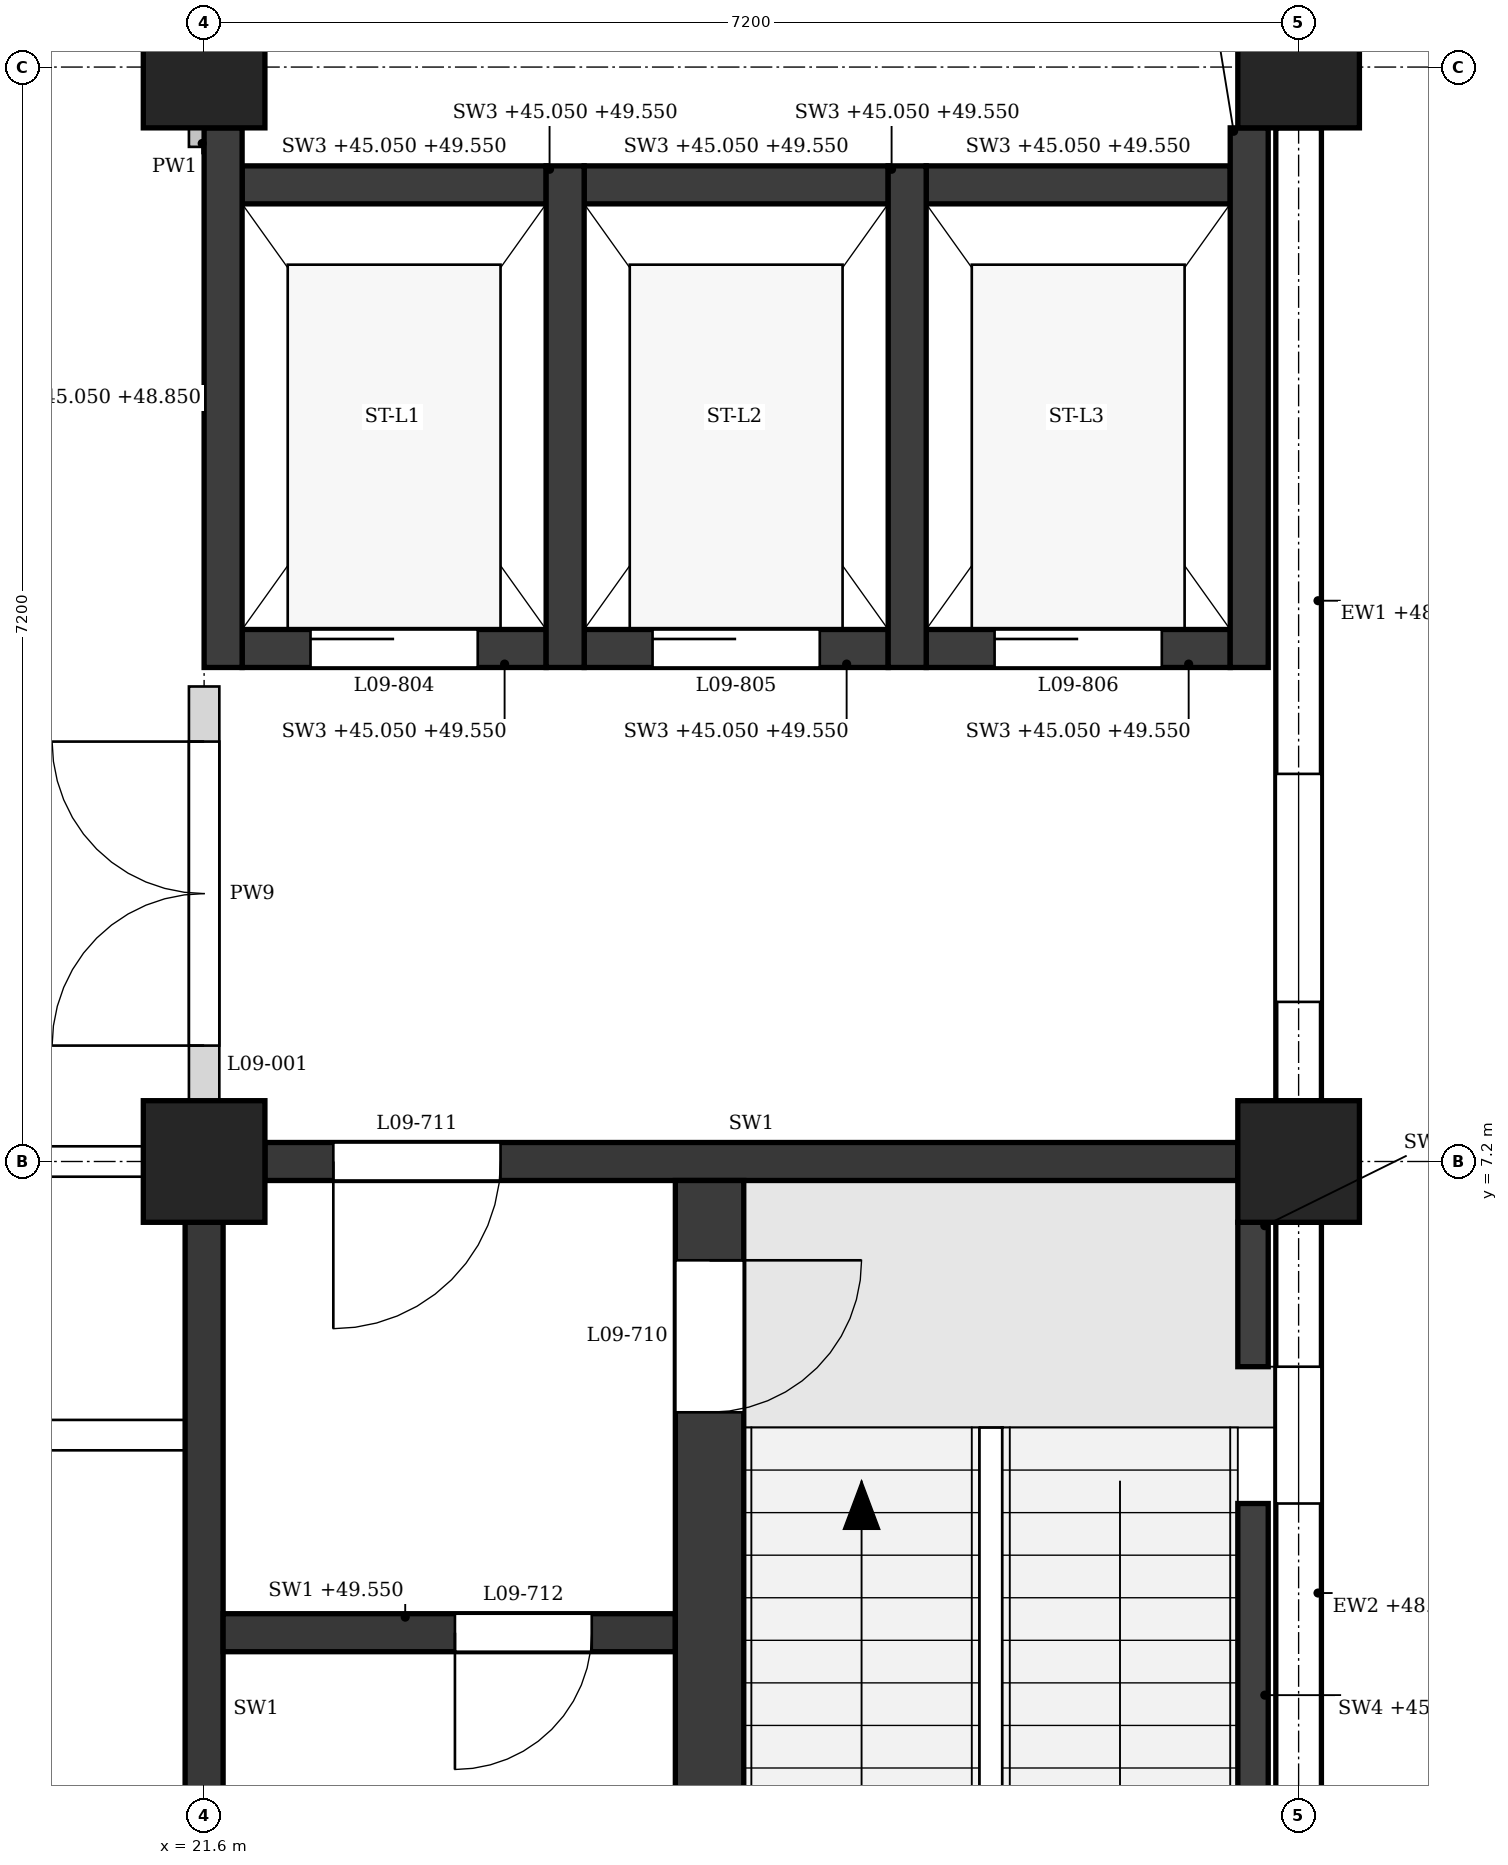
"""IFC4 building model, lengths in metres.
Left out: names, types, materials, properties, quantities, classifications, styles, units other than length and angle.
Written with IfcOpenShell. Run it as: python <this file> out.ifc"""

import sys

from ifc_helpers import new_model, si_unit, direction, frame, frame_2d, origin, origin_2d, place, context, subcontext, project, spatial, polyline, rectangle, outline, extrude, element, fill, save


model = new_model("IFC4")
c1 = context("Model", 3, precision=1e-05, world=origin(), true_north=direction((0.0, 1.0)))
c2 = subcontext(c1, "Body", "Model", "MODEL_VIEW")
j1 = project(units=[si_unit("LENGTHUNIT", "METRE"), si_unit("PLANEANGLEUNIT", "RADIAN")], contexts=[c1])
p1 = place(None, origin())
s1 = spatial("IfcSite", under=j1, at=p1, CompositionType="ELEMENT")
p2 = place(p1, origin())
s2 = spatial("IfcBuilding", under=s1, at=p2, CompositionType="ELEMENT")
p3 = place(p2, frame((0.0, 0.0, 45.3)))
s3 = spatial("IfcBuildingStorey", under=s2, at=p3, CompositionType="ELEMENT", Elevation=45.3)
for number, where, z_axis, x_axis in (
    (1, (21.6, 7.2, 0.0), (0.0, 0.0, 1.0), (1.0, 0.0, 0.0)),
    (2, (21.6, 14.4, 0.0), (0.0, 0.0, 1.0), (1.0, 0.0, 0.0)),
    (3, (28.8, 7.2, 0.0), (0.0, 0.0, 1.0), (1.0, 0.0, 0.0)),
    (4, (28.8, 14.4, 0.0), (0.0, 0.0, 1.0), (1.0, 0.0, 0.0)),
):
    element("IfcColumn", number, at=place(p3, frame(where, z_axis=z_axis, x_axis=x_axis)), inside=s3, PredefinedType="COLUMN", context=c2, shape_type="SweptSolid", body=[
        extrude(rectangle(XDim=0.8, YDim=0.8, at=origin_2d()), origin(), (0.0, 0.0, 1.0), 4.5),
    ])
p4 = place(p3, frame((28.8, 0.4, 0.0), z_axis=(0.0, 0.0, 1.0), x_axis=(0.0, 1.0, 0.0)))
e5 = element("IfcWall", 5, at=p4, inside=s3, PredefinedType="STANDARD", context=c2, shape_type="SweptSolid", body=[
    extrude(rectangle(XDim=6.4, YDim=0.3, at=frame_2d((3.2, 0.0))), origin(), (0.0, 0.0, 1.0), 3.65),
])
p5 = place(p4, frame((0.95, 0.0, 0.9)))
e6 = element("IfcOpeningElement", 6, at=p5, cuts=e5, PredefinedType="OPENING", context=c2, shape_type="SweptSolid", body=[
    extrude(outline(polyline([(0.0, 0.0), (0.9, 0.0), (0.9, 2.25), (0.45, 2.7), (0.0, 2.25), (0.0, 0.0)])), frame((0.0, 0.16, 0.0), z_axis=(0.0, -1.0, 0.0), x_axis=(1.0, 0.0, 0.0)), (0.0, 0.0, 1.0), 0.32),
])
p6 = place(p4, frame((4.55, 0.0, 0.9)))
e7 = element("IfcOpeningElement", 7, at=p6, cuts=e5, PredefinedType="OPENING", context=c2, shape_type="SweptSolid", body=[
    extrude(outline(polyline([(0.0, 0.0), (0.9, 0.0), (0.9, 2.25), (0.45, 2.7), (0.0, 2.25), (0.0, 0.0)])), frame((0.0, 0.16, 0.0), z_axis=(0.0, -1.0, 0.0), x_axis=(1.0, 0.0, 0.0)), (0.0, 0.0, 1.0), 0.32),
])
p7 = place(p3, frame((28.8, 7.6, 0.0), z_axis=(0.0, 0.0, 1.0), x_axis=(0.0, 1.0, 0.0)))
e8 = element("IfcWall", 8, at=p7, inside=s3, PredefinedType="STANDARD", context=c2, shape_type="SweptSolid", body=[
    extrude(rectangle(XDim=6.4, YDim=0.3, at=frame_2d((3.2, 0.0))), origin(), (0.0, 0.0, 1.0), 3.65),
])
p8 = place(p7, frame((0.65, 0.0, 0.9)))
e9 = element("IfcOpeningElement", 9, at=p8, cuts=e8, PredefinedType="OPENING", context=c2, shape_type="SweptSolid", body=[
    extrude(outline(polyline([(0.0, 0.0), (1.5, 0.0), (1.5, 1.95), (0.75, 2.7), (0.0, 1.95), (0.0, 0.0)])), frame((0.0, 0.16, 0.0), z_axis=(0.0, -1.0, 0.0), x_axis=(1.0, 0.0, 0.0)), (0.0, 0.0, 1.0), 0.32),
])
p9 = place(p3, frame((22.0, 7.2, 0.0), z_axis=(0.0, 0.0, 1.0), x_axis=(1.0, 0.0, 0.0)))
e10 = element("IfcWall", 10, at=p9, inside=s3, PredefinedType="SHEAR", context=c2, shape_type="SweptSolid", body=[
    extrude(rectangle(XDim=6.4, YDim=0.25, at=frame_2d((3.2, 0.0))), origin(), (0.0, 0.0, 1.0), 3.55),
])
p10 = place(p9, frame((0.45, 0.0, 0.0)))
e11 = element("IfcOpeningElement", 11, at=p10, cuts=e10, PredefinedType="OPENING", context=c2, shape_type="SweptSolid", body=[
    extrude(rectangle(XDim=1.1, YDim=2.1, at=frame_2d((0.55, 1.05))), frame((0.0, 0.135, 0.0), z_axis=(0.0, -1.0, 0.0), x_axis=(1.0, 0.0, 0.0)), (0.0, 0.0, 1.0), 0.27),
])
p11 = place(p3, frame((21.6, 0.4, 0.0), z_axis=(0.0, 0.0, 1.0), x_axis=(0.0, 1.0, 0.0)))
e12 = element("IfcWall", 12, at=p11, inside=s3, PredefinedType="SHEAR", context=c2, shape_type="SweptSolid", body=[
    extrude(rectangle(XDim=6.4, YDim=0.25, at=frame_2d((3.2, 0.0))), origin(), (0.0, 0.0, 1.0), 3.55),
])
p12 = place(p3, frame((28.5, 2.25, -0.25), z_axis=(0.0, 0.0, 1.0), x_axis=(0.0, 1.0, 0.0)))
e13 = element("IfcWall", 13, at=p12, inside=s3, PredefinedType="SHEAR", context=c2, shape_type="SweptSolid", body=[
    extrude(rectangle(XDim=2.7, YDim=0.2, at=frame_2d((1.35, 0.0))), origin(), (0.0, 0.0, 1.0), 4.5),
])
p13 = place(p3, frame((28.5, 5.85, -0.25), z_axis=(0.0, 0.0, 1.0), x_axis=(0.0, 1.0, 0.0)))
e14 = element("IfcWall", 14, at=p13, inside=s3, PredefinedType="SHEAR", context=c2, shape_type="SweptSolid", body=[
    extrude(rectangle(XDim=0.95, YDim=0.2, at=frame_2d((0.475, 0.0))), origin(), (0.0, 0.0, 1.0), 4.5),
])
p14 = place(p3, frame((24.925, 0.15, 0.0), z_axis=(0.0, 0.0, 1.0), x_axis=(0.0, 1.0, 0.0)))
e15 = element("IfcWall", 15, at=p14, inside=s3, PredefinedType="SHEAR", context=c2, shape_type="SweptSolid", body=[
    extrude(rectangle(XDim=6.925, YDim=0.45, at=frame_2d((3.462, 0.0))), origin(), (0.0, 0.0, 1.0), 4.25),
])
p15 = place(p14, frame((5.4, 0.0, 0.0)))
e16 = element("IfcOpeningElement", 16, at=p15, cuts=e15, PredefinedType="OPENING", context=c2, shape_type="SweptSolid", body=[
    extrude(rectangle(XDim=1.0, YDim=2.1, at=frame_2d((0.5, 1.05))), frame((0.0, 0.235, 0.0), z_axis=(0.0, -1.0, 0.0), x_axis=(1.0, 0.0, 0.0)), (0.0, 0.0, 1.0), 0.47),
])
p16 = place(p3, frame((21.725, 4.1, 0.0), z_axis=(0.0, 0.0, 1.0), x_axis=(1.0, 0.0, 0.0)))
e17 = element("IfcWall", 17, at=p16, inside=s3, PredefinedType="SHEAR", context=c2, shape_type="SweptSolid", body=[
    extrude(rectangle(XDim=2.975, YDim=0.25, at=frame_2d((1.487, 0.0))), origin(), (0.0, 0.0, 1.0), 4.25),
])
p17 = place(p16, frame((1.525, 0.0, 0.0)))
e18 = element("IfcOpeningElement", 18, at=p17, cuts=e17, PredefinedType="OPENING", context=c2, shape_type="SweptSolid", body=[
    extrude(rectangle(XDim=0.9, YDim=2.1, at=frame_2d((0.45, 1.05))), frame((0.0, 0.135, 0.0), z_axis=(0.0, -1.0, 0.0), x_axis=(1.0, 0.0, 0.0)), (0.0, 0.0, 1.0), 0.27),
])
p18 = place(p3, frame((21.725, 10.45, -0.25), z_axis=(0.0, 0.0, 1.0), x_axis=(0.0, 1.0, 0.0)))
e19 = element("IfcWall", 19, at=p18, inside=s3, PredefinedType="SHEAR", context=c2, shape_type="SweptSolid", body=[
    extrude(rectangle(XDim=3.55, YDim=0.25, at=frame_2d((1.775, 0.0))), origin(), (0.0, 0.0, 1.0), 3.8),
])
for number, where, z_axis, x_axis in (
    (20, (23.975, 10.45, -0.25), (0.0, 0.0, 1.0), (0.0, 1.0, 0.0)),
    (21, (26.225, 10.45, -0.25), (0.0, 0.0, 1.0), (0.0, 1.0, 0.0)),
):
    element("IfcWall", number, at=place(p3, frame(where, z_axis=z_axis, x_axis=x_axis)), inside=s3, PredefinedType="SHEAR", context=c2, shape_type="SweptSolid", body=[
        extrude(rectangle(XDim=3.3, YDim=0.25, at=frame_2d((1.65, 0.0))), origin(), (0.0, 0.0, 1.0), 4.5),
    ])
p19 = place(p3, frame((28.475, 10.45, -0.25), z_axis=(0.0, 0.0, 1.0), x_axis=(0.0, 1.0, 0.0)))
e22 = element("IfcWall", 22, at=p19, inside=s3, PredefinedType="SHEAR", context=c2, shape_type="SweptSolid", body=[
    extrude(rectangle(XDim=3.55, YDim=0.25, at=frame_2d((1.775, 0.0))), origin(), (0.0, 0.0, 1.0), 4.5),
])
p20 = place(p3, frame((21.85, 10.575, -0.25), z_axis=(0.0, 0.0, 1.0), x_axis=(1.0, 0.0, 0.0)))
e23 = element("IfcWall", 23, at=p20, inside=s3, PredefinedType="SHEAR", context=c2, shape_type="SweptSolid", body=[
    extrude(rectangle(XDim=2.0, YDim=0.25, at=frame_2d((1.0, 0.0))), origin(), (0.0, 0.0, 1.0), 4.5),
])
p21 = place(p20, frame((0.45, 0.0, 0.25)))
e24 = element("IfcOpeningElement", 24, at=p21, cuts=e23, PredefinedType="OPENING", context=c2, shape_type="SweptSolid", body=[
    extrude(rectangle(XDim=1.1, YDim=2.1, at=frame_2d((0.55, 1.05))), frame((0.0, 0.135, 0.0), z_axis=(0.0, -1.0, 0.0), x_axis=(1.0, 0.0, 0.0)), (0.0, 0.0, 1.0), 0.27),
])
p22 = place(p3, frame((21.85, 13.625, -0.25), z_axis=(0.0, 0.0, 1.0), x_axis=(1.0, 0.0, 0.0)))
e25 = element("IfcWall", 25, at=p22, inside=s3, PredefinedType="SHEAR", context=c2, shape_type="SweptSolid", body=[
    extrude(rectangle(XDim=2.0, YDim=0.25, at=frame_2d((1.0, 0.0))), origin(), (0.0, 0.0, 1.0), 4.5),
])
p23 = place(p3, frame((24.1, 10.575, -0.25), z_axis=(0.0, 0.0, 1.0), x_axis=(1.0, 0.0, 0.0)))
e26 = element("IfcWall", 26, at=p23, inside=s3, PredefinedType="SHEAR", context=c2, shape_type="SweptSolid", body=[
    extrude(rectangle(XDim=2.0, YDim=0.25, at=frame_2d((1.0, 0.0))), origin(), (0.0, 0.0, 1.0), 4.5),
])
p24 = place(p23, frame((0.45, 0.0, 0.25)))
e27 = element("IfcOpeningElement", 27, at=p24, cuts=e26, PredefinedType="OPENING", context=c2, shape_type="SweptSolid", body=[
    extrude(rectangle(XDim=1.1, YDim=2.1, at=frame_2d((0.55, 1.05))), frame((0.0, 0.135, 0.0), z_axis=(0.0, -1.0, 0.0), x_axis=(1.0, 0.0, 0.0)), (0.0, 0.0, 1.0), 0.27),
])
p25 = place(p3, frame((24.1, 13.625, -0.25), z_axis=(0.0, 0.0, 1.0), x_axis=(1.0, 0.0, 0.0)))
e28 = element("IfcWall", 28, at=p25, inside=s3, PredefinedType="SHEAR", context=c2, shape_type="SweptSolid", body=[
    extrude(rectangle(XDim=2.0, YDim=0.25, at=frame_2d((1.0, 0.0))), origin(), (0.0, 0.0, 1.0), 4.5),
])
p26 = place(p3, frame((26.35, 10.575, -0.25), z_axis=(0.0, 0.0, 1.0), x_axis=(1.0, 0.0, 0.0)))
e29 = element("IfcWall", 29, at=p26, inside=s3, PredefinedType="SHEAR", context=c2, shape_type="SweptSolid", body=[
    extrude(rectangle(XDim=2.0, YDim=0.25, at=frame_2d((1.0, 0.0))), origin(), (0.0, 0.0, 1.0), 4.5),
])
p27 = place(p26, frame((0.45, 0.0, 0.25)))
e30 = element("IfcOpeningElement", 30, at=p27, cuts=e29, PredefinedType="OPENING", context=c2, shape_type="SweptSolid", body=[
    extrude(rectangle(XDim=1.1, YDim=2.1, at=frame_2d((0.55, 1.05))), frame((0.0, 0.135, 0.0), z_axis=(0.0, -1.0, 0.0), x_axis=(1.0, 0.0, 0.0)), (0.0, 0.0, 1.0), 0.27),
])
p28 = place(p3, frame((26.35, 13.625, -0.25), z_axis=(0.0, 0.0, 1.0), x_axis=(1.0, 0.0, 0.0)))
e31 = element("IfcWall", 31, at=p28, inside=s3, PredefinedType="SHEAR", context=c2, shape_type="SweptSolid", body=[
    extrude(rectangle(XDim=2.0, YDim=0.25, at=frame_2d((1.0, 0.0))), origin(), (0.0, 0.0, 1.0), 4.5),
])
p29 = place(p3, frame((7.325, 5.4, 0.0), z_axis=(0.0, 0.0, 1.0), x_axis=(1.0, 0.0, 0.0)))
e32 = element("IfcWall", 32, at=p29, inside=s3, PredefinedType="PARTITIONING", context=c2, shape_type="SweptSolid", body=[
    extrude(outline(polyline([(0.0, 0.0), (14.15, 0.0), (14.15, 3.55), (14.05, 3.55), (14.05, 4.25), (7.3, 4.25), (7.3, 3.55), (6.85, 3.55), (6.85, 4.25), (0.1, 4.25), (0.1, 3.55), (0.0, 3.55), (0.0, 0.0)])), frame((0.0, 0.1, 0.0), z_axis=(0.0, -1.0, 0.0), x_axis=(1.0, 0.0, 0.0)), (0.0, 0.0, 1.0), 0.2),
])
p30 = place(p29, frame((1.238, 0.0, 0.0)))
e33 = element("IfcOpeningElement", 33, at=p30, cuts=e32, PredefinedType="OPENING", context=c2, shape_type="SweptSolid", body=[
    extrude(rectangle(XDim=1.0, YDim=2.1, at=frame_2d((0.5, 1.05))), frame((0.0, 0.11, 0.0), z_axis=(0.0, -1.0, 0.0), x_axis=(1.0, 0.0, 0.0)), (0.0, 0.0, 1.0), 0.22),
])
p31 = place(p29, frame((4.775, 0.0, 0.0)))
e34 = element("IfcOpeningElement", 34, at=p31, cuts=e32, PredefinedType="OPENING", context=c2, shape_type="SweptSolid", body=[
    extrude(rectangle(XDim=1.0, YDim=2.1, at=frame_2d((0.5, 1.05))), frame((0.0, 0.11, 0.0), z_axis=(0.0, -1.0, 0.0), x_axis=(1.0, 0.0, 0.0)), (0.0, 0.0, 1.0), 0.22),
])
p32 = place(p29, frame((8.375, 0.0, 0.0)))
e35 = element("IfcOpeningElement", 35, at=p32, cuts=e32, PredefinedType="OPENING", context=c2, shape_type="SweptSolid", body=[
    extrude(rectangle(XDim=1.0, YDim=2.1, at=frame_2d((0.5, 1.05))), frame((0.0, 0.11, 0.0), z_axis=(0.0, -1.0, 0.0), x_axis=(1.0, 0.0, 0.0)), (0.0, 0.0, 1.0), 0.22),
])
p33 = place(p29, frame((11.913, 0.0, 0.0)))
e36 = element("IfcOpeningElement", 36, at=p33, cuts=e32, PredefinedType="OPENING", context=c2, shape_type="SweptSolid", body=[
    extrude(rectangle(XDim=1.0, YDim=2.1, at=frame_2d((0.5, 1.05))), frame((0.0, 0.11, 0.0), z_axis=(0.0, -1.0, 0.0), x_axis=(1.0, 0.0, 0.0)), (0.0, 0.0, 1.0), 0.22),
])
p34 = place(p3, frame((14.8, 7.2, 0.0), z_axis=(0.0, 0.0, 1.0), x_axis=(1.0, 0.0, 0.0)))
e37 = element("IfcWall", 37, at=p34, inside=s3, PredefinedType="PARTITIONING", context=c2, shape_type="SweptSolid", body=[
    extrude(rectangle(XDim=6.4, YDim=0.2, at=frame_2d((3.2, 0.0))), origin(), (0.0, 0.0, 1.0), 3.55),
])
p35 = place(p34, frame((4.3, 0.0, 0.0)))
e38 = element("IfcOpeningElement", 38, at=p35, cuts=e37, PredefinedType="OPENING", context=c2, shape_type="SweptSolid", body=[
    extrude(rectangle(XDim=1.0, YDim=2.1, at=frame_2d((0.5, 1.05))), frame((0.0, 0.11, 0.0), z_axis=(0.0, -1.0, 0.0), x_axis=(1.0, 0.0, 0.0)), (0.0, 0.0, 1.0), 0.22),
])
p36 = place(p3, frame((21.6, 7.6, 0.0), z_axis=(0.0, 0.0, 1.0), x_axis=(0.0, 1.0, 0.0)))
e39 = element("IfcWall", 39, at=p36, inside=s3, PredefinedType="PARTITIONING", context=c2, shape_type="SweptSolid", body=[
    extrude(rectangle(XDim=2.725, YDim=0.2, at=frame_2d((1.362, 0.0))), origin(), (0.0, 0.0, 1.0), 3.55),
])
p37 = place(p36, frame((0.362, 0.0, 0.0)))
e40 = element("IfcOpeningElement", 40, at=p37, cuts=e39, PredefinedType="OPENING", context=c2, shape_type="SweptSolid", body=[
    extrude(rectangle(XDim=2.0, YDim=2.4, at=frame_2d((1.0, 1.2))), frame((0.0, 0.11, 0.0), z_axis=(0.0, -1.0, 0.0), x_axis=(1.0, 0.0, 0.0)), (0.0, 0.0, 1.0), 0.22),
])
p38 = place(p3, frame((21.6, 13.875, 0.0), z_axis=(0.0, 0.0, 1.0), x_axis=(0.0, 1.0, 0.0)))
e41 = element("IfcWall", 41, at=p38, inside=s3, PredefinedType="PARTITIONING", context=c2, shape_type="SweptSolid", body=[
    extrude(rectangle(XDim=0.125, YDim=0.2, at=frame_2d((0.062, 0.0))), origin(), (0.0, 0.0, 1.0), 3.55),
])
p39 = place(p6, origin())
e42 = element("IfcWindow", 42, at=p39, inside=s3, PartitioningType="SINGLE_PANEL", PredefinedType="WINDOW", context=c2, shape_type="SweptSolid", body=[
    extrude(outline(polyline([(0.0, 0.0), (0.9, 0.0), (0.9, 2.25), (0.45, 2.7), (0.0, 2.25), (0.0, 0.0)])), frame((0.0, 0.03, 0.0), z_axis=(0.0, -1.0, 0.0), x_axis=(1.0, 0.0, 0.0)), (0.0, 0.0, 1.0), 0.06),
])
fill(e7, e42)
p40 = place(p8, origin())
e43 = element("IfcWindow", 43, at=p40, inside=s3, PartitioningType="SINGLE_PANEL", PredefinedType="WINDOW", context=c2, shape_type="SweptSolid", body=[
    extrude(outline(polyline([(0.0, 0.0), (1.5, 0.0), (1.5, 1.95), (0.75, 2.7), (0.0, 1.95), (0.0, 0.0)])), frame((0.0, 0.03, 0.0), z_axis=(0.0, -1.0, 0.0), x_axis=(1.0, 0.0, 0.0)), (0.0, 0.0, 1.0), 0.06),
])
fill(e9, e43)
p41 = place(p15, frame((1.0, 0.0, 0.0), z_axis=(0.0, 0.0, 1.0), x_axis=(-1.0, 0.0, 0.0)))
e44 = element("IfcDoor", 44, at=p41, inside=s3, OperationType="SINGLE_SWING_LEFT", PredefinedType="DOOR", context=c2, shape_type="SweptSolid", body=[
    extrude(rectangle(XDim=1.0, YDim=2.1, at=frame_2d((0.5, 1.05))), frame((0.0, 0.025, 0.0), z_axis=(0.0, -1.0, 0.0), x_axis=(1.0, 0.0, 0.0)), (0.0, 0.0, 1.0), 0.05),
])
fill(e16, e44)
p42 = place(p10, frame((1.1, 0.0, 0.0), z_axis=(0.0, 0.0, 1.0), x_axis=(-1.0, 0.0, 0.0)))
e45 = element("IfcDoor", 45, at=p42, inside=s3, OperationType="SINGLE_SWING_RIGHT", PredefinedType="DOOR", context=c2, shape_type="SweptSolid", body=[
    extrude(rectangle(XDim=1.1, YDim=2.1, at=frame_2d((0.55, 1.05))), frame((0.0, 0.025, 0.0), z_axis=(0.0, -1.0, 0.0), x_axis=(1.0, 0.0, 0.0)), (0.0, 0.0, 1.0), 0.05),
])
fill(e11, e45)
p43 = place(p17, frame((0.9, 0.0, 0.0), z_axis=(0.0, 0.0, 1.0), x_axis=(-1.0, 0.0, 0.0)))
e46 = element("IfcDoor", 46, at=p43, inside=s3, OperationType="SINGLE_SWING_RIGHT", PredefinedType="DOOR", context=c2, shape_type="SweptSolid", body=[
    extrude(rectangle(XDim=0.9, YDim=2.1, at=frame_2d((0.45, 1.05))), frame((0.0, 0.025, 0.0), z_axis=(0.0, -1.0, 0.0), x_axis=(1.0, 0.0, 0.0)), (0.0, 0.0, 1.0), 0.05),
])
fill(e18, e46)
p44 = place(p21, origin())
e47 = element("IfcDoor", 47, at=p44, inside=s3, OperationType="SLIDING_TO_LEFT", PredefinedType="DOOR", context=c2, shape_type="SweptSolid", body=[
    extrude(rectangle(XDim=1.1, YDim=2.1, at=frame_2d((0.55, 1.05))), frame((0.0, 0.025, 0.0), z_axis=(0.0, -1.0, 0.0), x_axis=(1.0, 0.0, 0.0)), (0.0, 0.0, 1.0), 0.05),
])
fill(e24, e47)
p45 = place(p24, origin())
e48 = element("IfcDoor", 48, at=p45, inside=s3, OperationType="SLIDING_TO_LEFT", PredefinedType="DOOR", context=c2, shape_type="SweptSolid", body=[
    extrude(rectangle(XDim=1.1, YDim=2.1, at=frame_2d((0.55, 1.05))), frame((0.0, 0.025, 0.0), z_axis=(0.0, -1.0, 0.0), x_axis=(1.0, 0.0, 0.0)), (0.0, 0.0, 1.0), 0.05),
])
fill(e27, e48)
p46 = place(p27, origin())
e49 = element("IfcDoor", 49, at=p46, inside=s3, OperationType="SLIDING_TO_LEFT", PredefinedType="DOOR", context=c2, shape_type="SweptSolid", body=[
    extrude(rectangle(XDim=1.1, YDim=2.1, at=frame_2d((0.55, 1.05))), frame((0.0, 0.025, 0.0), z_axis=(0.0, -1.0, 0.0), x_axis=(1.0, 0.0, 0.0)), (0.0, 0.0, 1.0), 0.05),
])
fill(e30, e49)
p47 = place(p37, origin())
e50 = element("IfcDoor", 50, at=p47, inside=s3, OperationType="DOUBLE_DOOR_SINGLE_SWING", PredefinedType="DOOR", context=c2, shape_type="SweptSolid", body=[
    extrude(rectangle(XDim=2.0, YDim=2.4, at=frame_2d((1.0, 1.2))), frame((0.0, 0.025, 0.0), z_axis=(0.0, -1.0, 0.0), x_axis=(1.0, 0.0, 0.0)), (0.0, 0.0, 1.0), 0.05),
])
fill(e40, e50)
save(model, sys.argv[1])
